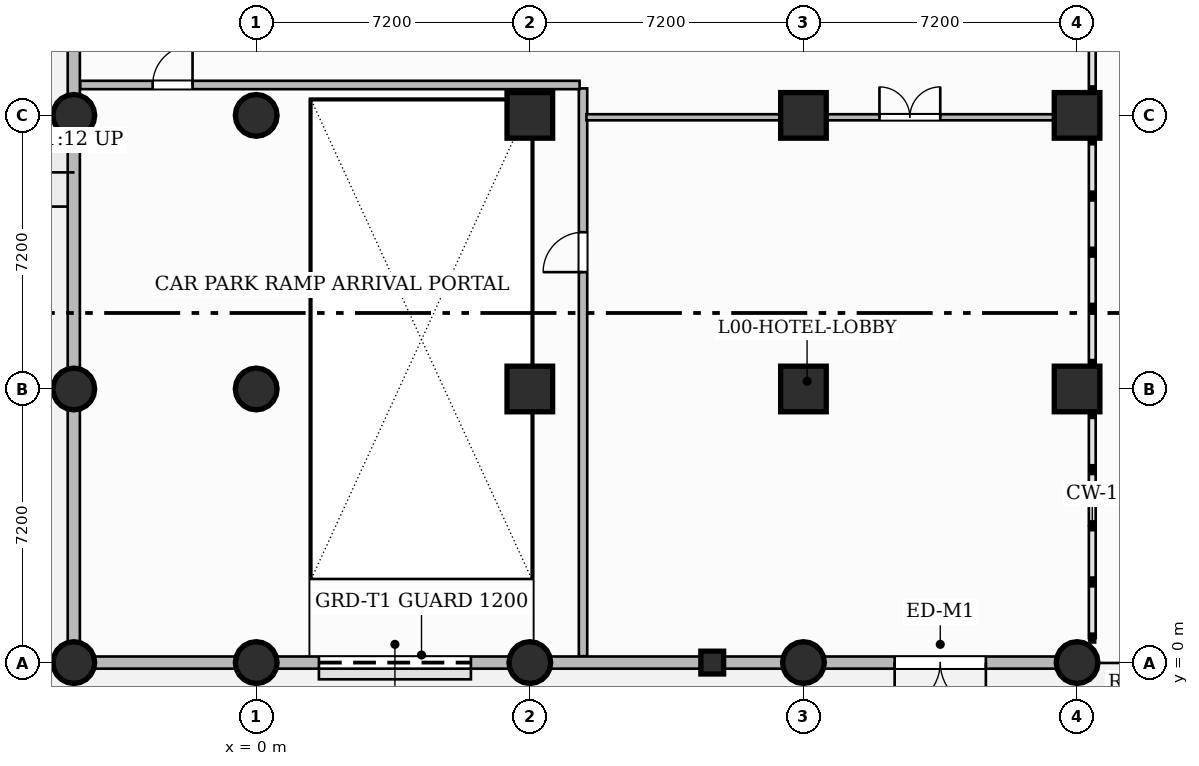
"""IFC4 building model, lengths in metres.
Left out: names, types, materials, properties, quantities, classifications, styles, units other than length and angle.
Written with IfcOpenShell. Run it as: python <this file> out.ifc"""

import sys

from ifc_helpers import new_model, si_unit, direction, frame, frame_2d, origin, origin_2d, place, context, subcontext, project, spatial, rectangle, circle, extrude, source, transform, mapped, element, fill, save


model = new_model("IFC4")
c1 = context("Model", 3, precision=1e-05, world=origin(), true_north=direction((0.0, 1.0)))
c2 = subcontext(c1, "Body", "Model", "MODEL_VIEW")
j1 = project(units=[si_unit("LENGTHUNIT", "METRE"), si_unit("PLANEANGLEUNIT", "RADIAN")], contexts=[c1])
p1 = place(None, origin())
s1 = spatial("IfcSite", under=j1, at=p1, CompositionType="ELEMENT")
p2 = place(p1, origin())
s2 = spatial("IfcBuilding", under=s1, at=p2, CompositionType="ELEMENT")
p3 = place(p2, origin())
s3 = spatial("IfcBuildingStorey", under=s2, at=p3, CompositionType="ELEMENT", Elevation=0.0)
m1 = source(origin(), c2, "Body", "SweptSolid", [
    extrude(circle(Radius=0.55, at=origin_2d()), origin(), (0.0, 0.0, 1.0), 5.4),
])
for number, where, z_axis, x_axis in (
    (1, (-4.8, 0.0, 0.0), (0.0, 0.0, 1.0), (1.0, 0.0, 0.0)),
    (2, (-4.8, 7.2, 0.0), (0.0, 0.0, 1.0), (1.0, 0.0, 0.0)),
    (3, (-4.8, 14.4, 0.0), (0.0, 0.0, 1.0), (1.0, 0.0, 0.0)),
    (4, (0.0, 0.0, 0.0), (0.0, 0.0, 1.0), (1.0, 0.0, 0.0)),
    (5, (0.0, 7.2, 0.0), (0.0, 0.0, 1.0), (1.0, 0.0, 0.0)),
    (6, (0.0, 14.4, 0.0), (0.0, 0.0, 1.0), (1.0, 0.0, 0.0)),
    (7, (7.2, 0.0, 0.0), (0.0, 0.0, 1.0), (1.0, 0.0, 0.0)),
):
    element("IfcColumn", number, at=place(p3, frame(where, z_axis=z_axis, x_axis=x_axis)), inside=s3, PredefinedType="COLUMN", context=c2, shape_type="MappedRepresentation", body=[
        mapped(m1, transform((0.0, 0.0, 0.0), scale=1.0)),
    ])
m2 = source(origin(), c2, "Body", "SweptSolid", [
    extrude(rectangle(XDim=1.2, YDim=1.2, at=origin_2d()), origin(), (0.0, 0.0, 1.0), 5.4),
])
for number, where, z_axis, x_axis in (
    (8, (7.2, 7.2, 0.0), (0.0, 0.0, 1.0), (1.0, 0.0, 0.0)),
    (9, (7.2, 14.4, 0.0), (0.0, 0.0, 1.0), (1.0, 0.0, 0.0)),
):
    element("IfcColumn", number, at=place(p3, frame(where, z_axis=z_axis, x_axis=x_axis)), inside=s3, PredefinedType="COLUMN", context=c2, shape_type="MappedRepresentation", body=[
        mapped(m2, transform((0.0, 0.0, 0.0), scale=1.0)),
    ])
p4 = place(p3, frame((14.4, 0.0, 0.0), z_axis=(0.0, 0.0, 1.0), x_axis=(1.0, 0.0, 0.0)))
e10 = element("IfcColumn", 10, at=p4, inside=s3, PredefinedType="COLUMN", context=c2, shape_type="MappedRepresentation", body=[
    mapped(m1, transform((0.0, 0.0, 0.0), scale=1.0)),
])
for number, where, z_axis, x_axis in (
    (11, (14.4, 7.2, 0.0), (0.0, 0.0, 1.0), (1.0, 0.0, 0.0)),
    (12, (14.4, 14.4, 0.0), (0.0, 0.0, 1.0), (1.0, 0.0, 0.0)),
):
    element("IfcColumn", number, at=place(p3, frame(where, z_axis=z_axis, x_axis=x_axis)), inside=s3, PredefinedType="COLUMN", context=c2, shape_type="MappedRepresentation", body=[
        mapped(m2, transform((0.0, 0.0, 0.0), scale=1.0)),
    ])
p5 = place(p3, frame((21.6, 0.0, 0.0), z_axis=(0.0, 0.0, 1.0), x_axis=(1.0, 0.0, 0.0)))
e13 = element("IfcColumn", 13, at=p5, inside=s3, PredefinedType="COLUMN", context=c2, shape_type="MappedRepresentation", body=[
    mapped(m1, transform((0.0, 0.0, 0.0), scale=1.0)),
])
for number, where, z_axis, x_axis in (
    (14, (21.6, 7.2, 0.0), (0.0, 0.0, 1.0), (1.0, 0.0, 0.0)),
    (15, (21.6, 14.4, 0.0), (0.0, 0.0, 1.0), (1.0, 0.0, 0.0)),
):
    element("IfcColumn", number, at=place(p3, frame(where, z_axis=z_axis, x_axis=x_axis)), inside=s3, PredefinedType="COLUMN", context=c2, shape_type="MappedRepresentation", body=[
        mapped(m2, transform((0.0, 0.0, 0.0), scale=1.0)),
    ])
m3 = source(origin(), c2, "Body", "SweptSolid", [
    extrude(rectangle(XDim=0.6, YDim=0.6, at=origin_2d()), origin(), (0.0, 0.0, 1.0), 5.4),
])
p6 = place(p3, frame((12.0, 0.0, 0.0), z_axis=(0.0, 0.0, 1.0), x_axis=(1.0, 0.0, 0.0)))
e16 = element("IfcColumn", 16, at=p6, inside=s3, PredefinedType="PILASTER", context=c2, shape_type="MappedRepresentation", body=[
    mapped(m3, transform((0.0, 0.0, 0.0), scale=1.0)),
])
p7 = place(p3, frame((8.6, 0.168, 0.0), z_axis=(0.0, 0.0, 1.0), x_axis=(0.0, 1.0, 0.0)))
e17 = element("IfcWall", 17, at=p7, inside=s3, PredefinedType="PARTITIONING", context=c2, shape_type="SweptSolid", body=[
    extrude(rectangle(XDim=14.942, YDim=0.22, at=frame_2d((7.471, 0.0))), origin(), (0.0, 0.0, 1.0), 5.1),
])
p8 = place(p7, frame((10.107, 0.0, 0.0)))
e18 = element("IfcOpeningElement", 18, at=p8, cuts=e17, PredefinedType="OPENING", context=c2, shape_type="SweptSolid", body=[
    extrude(rectangle(XDim=1.05, YDim=2.15, at=frame_2d((0.525, 1.075))), frame((0.0, 0.12, 0.0), z_axis=(0.0, -1.0, 0.0), x_axis=(1.0, 0.0, 0.0)), (0.0, 0.0, 1.0), 0.24),
])
p9 = place(p3, frame((-4.632, 15.2, 0.0), z_axis=(0.0, 0.0, 1.0), x_axis=(1.0, 0.0, 0.0)))
e19 = element("IfcWall", 19, at=p9, inside=s3, PredefinedType="PARTITIONING", context=c2, shape_type="SweptSolid", body=[
    extrude(rectangle(XDim=13.142, YDim=0.22, at=frame_2d((6.571, 0.0))), origin(), (0.0, 0.0, 1.0), 5.1),
])
p10 = place(p9, frame((1.907, 0.0, 0.0)))
e20 = element("IfcOpeningElement", 20, at=p10, cuts=e19, PredefinedType="OPENING", context=c2, shape_type="SweptSolid", body=[
    extrude(rectangle(XDim=1.05, YDim=2.15, at=frame_2d((0.525, 1.075))), frame((0.0, 0.12, 0.0), z_axis=(0.0, -1.0, 0.0), x_axis=(1.0, 0.0, 0.0)), (0.0, 0.0, 1.0), 0.24),
])
p11 = place(p3, frame((8.69, 14.35, 0.0), z_axis=(0.0, 0.0, 1.0), x_axis=(1.0, 0.0, 0.0)))
e21 = element("IfcWall", 21, at=p11, inside=s3, PredefinedType="PARTITIONING", context=c2, shape_type="SweptSolid", body=[
    extrude(rectangle(XDim=13.07, YDim=0.16, at=frame_2d((6.535, 0.0))), origin(), (0.0, 0.0, 1.0), 4.085),
])
p12 = place(p11, frame((7.71, 0.0, 0.0)))
e22 = element("IfcOpeningElement", 22, at=p12, cuts=e21, PredefinedType="OPENING", context=c2, shape_type="SweptSolid", body=[
    extrude(rectangle(XDim=1.6, YDim=2.4, at=frame_2d((0.8, 1.2))), frame((0.0, 0.09, 0.0), z_axis=(0.0, -1.0, 0.0), x_axis=(1.0, 0.0, 0.0)), (0.0, 0.0, 1.0), 0.18),
])
p13 = place(p3, frame((-4.8, 0.0, 0.0), z_axis=(0.0, 0.0, 1.0), x_axis=(1.0, 0.0, 0.0)))
e23 = element("IfcWall", 23, at=p13, inside=s3, PredefinedType="SOLIDWALL", context=c2, shape_type="SweptSolid", body=[
    extrude(rectangle(XDim=26.85, YDim=0.32, at=frame_2d((13.425, 0.0))), origin(), (0.0, 0.0, 1.0), 4.085),
])
p14 = place(p13, frame((6.45, 0.0, 0.0)))
e24 = element("IfcOpeningElement", 24, at=p14, cuts=e23, PredefinedType="OPENING", context=c2, shape_type="SweptSolid", body=[
    extrude(rectangle(XDim=4.0, YDim=3.2, at=frame_2d((2.0, 1.6))), frame((0.0, 0.17, 0.0), z_axis=(0.0, -1.0, 0.0), x_axis=(1.0, 0.0, 0.0)), (0.0, 0.0, 1.0), 0.34),
])
p15 = place(p13, frame((21.6, 0.0, 0.0)))
e25 = element("IfcOpeningElement", 25, at=p15, cuts=e23, PredefinedType="OPENING", context=c2, shape_type="SweptSolid", body=[
    extrude(rectangle(XDim=2.4, YDim=2.8, at=frame_2d((1.2, 1.4))), frame((0.0, 0.17, 0.0), z_axis=(0.0, -1.0, 0.0), x_axis=(1.0, 0.0, 0.0)), (0.0, 0.0, 1.0), 0.34),
])
p16 = place(p3, frame((-4.8, 0.05, 0.0), z_axis=(0.0, 0.0, 1.0), x_axis=(0.0, 1.0, 0.0)))
e26 = element("IfcWall", 26, at=p16, inside=s3, PredefinedType="SOLIDWALL", context=c2, shape_type="SweptSolid", body=[
    extrude(rectangle(XDim=46.7, YDim=0.32, at=frame_2d((23.35, 0.0))), origin(), (0.0, 0.0, 1.0), 4.085),
])
p17 = place(p16, frame((16.75, 0.0, 0.0)))
e27 = element("IfcOpeningElement", 27, at=p17, cuts=e26, PredefinedType="OPENING", context=c2, shape_type="SweptSolid", body=[
    extrude(rectangle(XDim=2.4, YDim=2.8, at=frame_2d((1.2, 1.4))), frame((0.0, 0.17, 0.0), z_axis=(0.0, -1.0, 0.0), x_axis=(1.0, 0.0, 0.0)), (0.0, 0.0, 1.0), 0.34),
])
p18 = place(p16, frame((27.85, 0.0, 0.0)))
e28 = element("IfcOpeningElement", 28, at=p18, cuts=e26, PredefinedType="OPENING", context=c2, shape_type="SweptSolid", body=[
    extrude(rectangle(XDim=1.8, YDim=2.4, at=frame_2d((0.9, 1.2))), frame((0.0, 0.17, 0.0), z_axis=(0.0, -1.0, 0.0), x_axis=(1.0, 0.0, 0.0)), (0.0, 0.0, 1.0), 0.34),
])
p19 = place(p16, frame((35.05, 0.0, 0.0)))
e29 = element("IfcOpeningElement", 29, at=p19, cuts=e26, PredefinedType="OPENING", context=c2, shape_type="SweptSolid", body=[
    extrude(rectangle(XDim=1.8, YDim=2.4, at=frame_2d((0.9, 1.2))), frame((0.0, 0.17, 0.0), z_axis=(0.0, -1.0, 0.0), x_axis=(1.0, 0.0, 0.0)), (0.0, 0.0, 1.0), 0.34),
])
m4 = source(origin(), c2, "Body", "SweptSolid", [
    extrude(rectangle(XDim=1.05, YDim=2.15, at=frame_2d((0.525, 1.075))), frame((0.0, 0.025, 0.0), z_axis=(0.0, -1.0, 0.0), x_axis=(1.0, 0.0, 0.0)), (0.0, 0.0, 1.0), 0.05),
])
p20 = place(p8, origin())
e30 = element("IfcDoor", 30, at=p20, inside=s3, OperationType="SINGLE_SWING_LEFT", PredefinedType="DOOR", context=c2, shape_type="MappedRepresentation", body=[
    mapped(m4, transform((0.0, 0.0, 0.0), scale=1.0)),
])
fill(e18, e30)
p21 = place(p10, origin())
e31 = element("IfcDoor", 31, at=p21, inside=s3, OperationType="SINGLE_SWING_RIGHT", PredefinedType="DOOR", context=c2, shape_type="MappedRepresentation", body=[
    mapped(m4, transform((0.0, 0.0, 0.0), scale=1.0)),
])
fill(e20, e31)
m5 = source(origin(), c2, "Body", "SweptSolid", [
    extrude(rectangle(XDim=1.6, YDim=2.4, at=frame_2d((0.8, 1.2))), frame((0.0, 0.025, 0.0), z_axis=(0.0, -1.0, 0.0), x_axis=(1.0, 0.0, 0.0)), (0.0, 0.0, 1.0), 0.05),
])
p22 = place(p12, origin())
e32 = element("IfcDoor", 32, at=p22, inside=s3, OperationType="DOUBLE_DOOR_SINGLE_SWING", PredefinedType="DOOR", context=c2, shape_type="MappedRepresentation", body=[
    mapped(m5, transform((0.0, 0.0, 0.0), scale=1.0)),
])
fill(e22, e32)
m6 = source(origin(), c2, "Body", "SweptSolid", [
    extrude(rectangle(XDim=4.0, YDim=3.2, at=frame_2d((2.0, 1.6))), frame((0.0, 0.025, 0.0), z_axis=(0.0, -1.0, 0.0), x_axis=(1.0, 0.0, 0.0)), (0.0, 0.0, 1.0), 0.05),
])
p23 = place(p14, frame((4.0, 0.0, 0.0), z_axis=(0.0, 0.0, 1.0), x_axis=(-1.0, 0.0, 0.0)))
e33 = element("IfcDoor", 33, at=p23, inside=s3, OperationType="ROLLINGUP", PredefinedType="GATE", context=c2, shape_type="MappedRepresentation", body=[
    mapped(m6, transform((0.0, 0.0, 0.0), scale=1.0)),
])
fill(e24, e33)
m7 = source(origin(), c2, "Body", "SweptSolid", [
    extrude(rectangle(XDim=2.4, YDim=2.8, at=frame_2d((1.2, 1.4))), frame((0.0, 0.025, 0.0), z_axis=(0.0, -1.0, 0.0), x_axis=(1.0, 0.0, 0.0)), (0.0, 0.0, 1.0), 0.05),
])
p24 = place(p15, frame((2.4, 0.0, 0.0), z_axis=(0.0, 0.0, 1.0), x_axis=(-1.0, 0.0, 0.0)))
e34 = element("IfcDoor", 34, at=p24, inside=s3, OperationType="DOUBLE_DOOR_SINGLE_SWING", PredefinedType="DOOR", context=c2, shape_type="MappedRepresentation", body=[
    mapped(m7, transform((0.0, 0.0, 0.0), scale=1.0)),
])
fill(e25, e34)
save(model, sys.argv[1])
